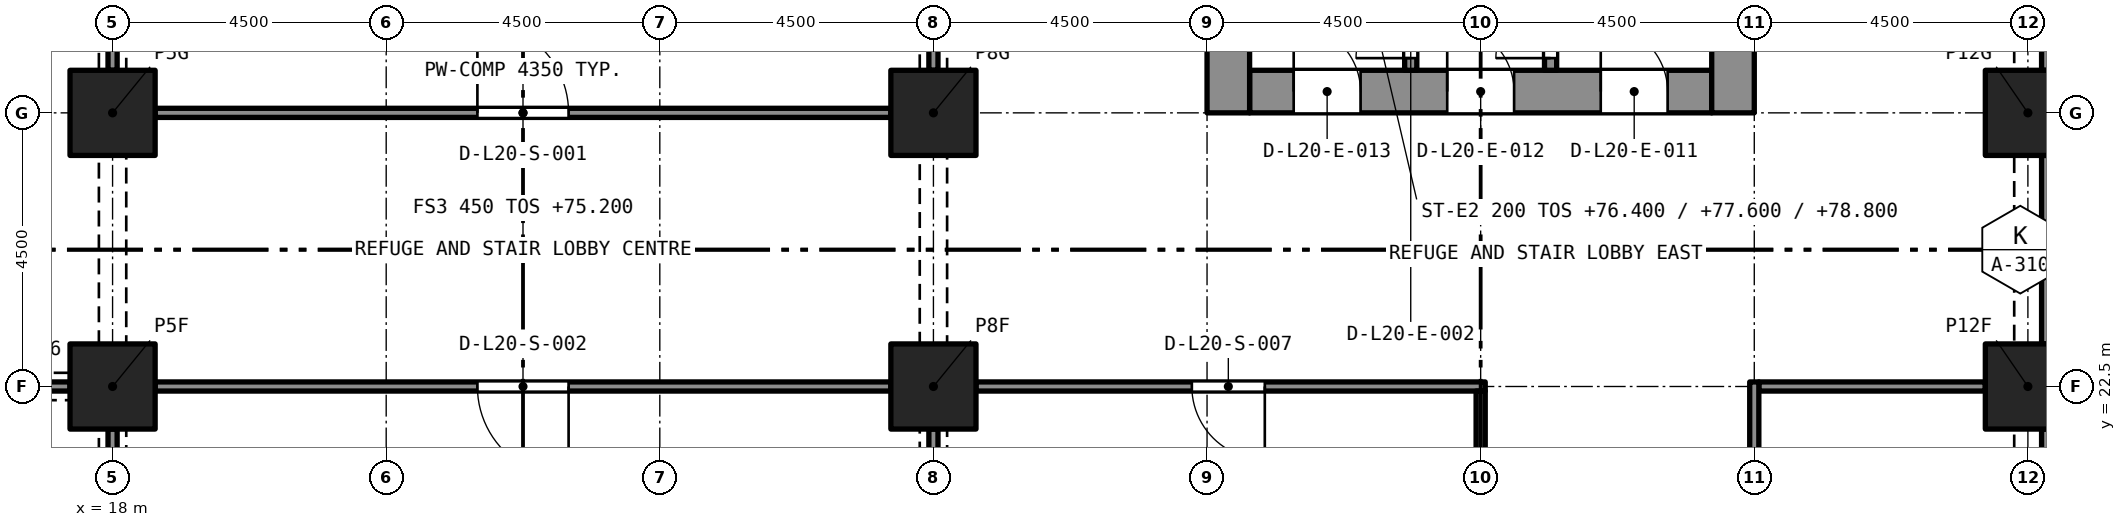
"""IFC4 building model, lengths in metres.
Left out: names, types, materials, properties, quantities, classifications, styles, units other than length and angle.
Written with IfcOpenShell. Run it as: python <this file> out.ifc"""

import sys

from ifc_helpers import new_model, si_unit, direction, frame, frame_2d, origin, origin_2d, place, context, subcontext, project, spatial, rectangle, extrude, element, fill, save


model = new_model("IFC4")
c1 = context("Model", 3, precision=1e-05, world=origin(), true_north=direction((0.0, 1.0)))
c2 = subcontext(c1, "Body", "Model", "MODEL_VIEW")
j1 = project(units=[si_unit("LENGTHUNIT", "METRE"), si_unit("PLANEANGLEUNIT", "RADIAN")], contexts=[c1])
p1 = place(None, origin())
s1 = spatial("IfcSite", under=j1, at=p1, CompositionType="ELEMENT")
p2 = place(p1, origin())
s2 = spatial("IfcBuilding", under=s1, at=p2, CompositionType="ELEMENT")
p3 = place(p2, frame((0.0, 0.0, 75.2)))
s3 = spatial("IfcBuildingStorey", under=s2, at=p3, CompositionType="ELEMENT", Elevation=75.2)
for number, where, z_axis, x_axis in (
    (1, (18.0, 22.5, 0.0), (0.0, 0.0, 1.0), (1.0, 0.0, 0.0)),
    (2, (31.5, 22.5, 0.0), (0.0, 0.0, 1.0), (1.0, 0.0, 0.0)),
    (3, (49.5, 22.5, 0.0), (0.0, 0.0, 1.0), (1.0, 0.0, 0.0)),
    (4, (18.0, 27.0, 0.0), (0.0, 0.0, 1.0), (1.0, 0.0, 0.0)),
    (5, (31.5, 27.0, 0.0), (0.0, 0.0, 1.0), (1.0, 0.0, 0.0)),
    (6, (49.5, 27.0, 0.0), (0.0, 0.0, 1.0), (1.0, 0.0, 0.0)),
):
    element("IfcColumn", number, at=place(p3, frame(where, z_axis=z_axis, x_axis=x_axis)), inside=s3, PredefinedType="COLUMN", context=c2, shape_type="SweptSolid", body=[
        extrude(rectangle(XDim=1.4, YDim=1.4, at=origin_2d()), origin(), (0.0, 0.0, 1.0), 4.8),
    ])
p4 = place(p3, frame((36.7, 27.35, 0.0), z_axis=(0.0, 0.0, 1.0), x_axis=(1.0, 0.0, 0.0)))
e7 = element("IfcWall", 7, at=p4, inside=s3, PredefinedType="SOLIDWALL", context=c2, shape_type="SweptSolid", body=[
    extrude(rectangle(XDim=7.6, YDim=0.7, at=frame_2d((3.8, 0.0))), origin(), (0.0, 0.0, 1.0), 4.8),
])
p5 = place(p4, frame((5.775, 0.0, 0.0)))
e8 = element("IfcOpeningElement", 8, at=p5, cuts=e7, PredefinedType="OPENING", context=c2, shape_type="SweptSolid", body=[
    extrude(rectangle(XDim=1.1, YDim=2.1, at=frame_2d((0.55, 1.05))), frame((0.0, 0.36, 0.0), z_axis=(0.0, -1.0, 0.0), x_axis=(1.0, 0.0, 0.0)), (0.0, 0.0, 1.0), 0.72),
])
p6 = place(p4, frame((3.25, 0.0, 0.0)))
e9 = element("IfcOpeningElement", 9, at=p6, cuts=e7, PredefinedType="OPENING", context=c2, shape_type="SweptSolid", body=[
    extrude(rectangle(XDim=1.1, YDim=2.1, at=frame_2d((0.55, 1.05))), frame((0.0, 0.36, 0.0), z_axis=(0.0, -1.0, 0.0), x_axis=(1.0, 0.0, 0.0)), (0.0, 0.0, 1.0), 0.72),
])
p7 = place(p4, frame((0.725, 0.0, 0.0)))
e10 = element("IfcOpeningElement", 10, at=p7, cuts=e7, PredefinedType="OPENING", context=c2, shape_type="SweptSolid", body=[
    extrude(rectangle(XDim=1.1, YDim=2.1, at=frame_2d((0.55, 1.05))), frame((0.0, 0.36, 0.0), z_axis=(0.0, -1.0, 0.0), x_axis=(1.0, 0.0, 0.0)), (0.0, 0.0, 1.0), 0.72),
])
p8 = place(p3, frame((36.35, 27.0, 0.0), z_axis=(0.0, 0.0, 1.0), x_axis=(0.0, 1.0, 0.0)))
e11 = element("IfcWall", 11, at=p8, inside=s3, PredefinedType="SOLIDWALL", context=c2, shape_type="SweptSolid", body=[
    extrude(rectangle(XDim=13.5, YDim=0.7, at=frame_2d((6.75, 0.0))), origin(), (0.0, 0.0, 1.0), 4.8),
])
p9 = place(p8, frame((8.95, 0.0, 0.0)))
e12 = element("IfcOpeningElement", 12, at=p9, cuts=e11, PredefinedType="OPENING", context=c2, shape_type="SweptSolid", body=[
    extrude(rectangle(XDim=1.2, YDim=2.1, at=frame_2d((0.6, 1.05))), frame((0.0, 0.36, 0.0), z_axis=(0.0, -1.0, 0.0), x_axis=(1.0, 0.0, 0.0)), (0.0, 0.0, 1.0), 0.72),
])
p10 = place(p3, frame((44.65, 27.0, 0.0), z_axis=(0.0, 0.0, 1.0), x_axis=(0.0, 1.0, 0.0)))
e13 = element("IfcWall", 13, at=p10, inside=s3, PredefinedType="SOLIDWALL", context=c2, shape_type="SweptSolid", body=[
    extrude(rectangle(XDim=13.5, YDim=0.7, at=frame_2d((6.75, 0.0))), origin(), (0.0, 0.0, 1.0), 4.8),
])
p11 = place(p10, frame((8.95, 0.0, 0.0)))
e14 = element("IfcOpeningElement", 14, at=p11, cuts=e13, PredefinedType="OPENING", context=c2, shape_type="SweptSolid", body=[
    extrude(rectangle(XDim=1.2, YDim=2.1, at=frame_2d((0.6, 1.05))), frame((0.0, 0.36, 0.0), z_axis=(0.0, -1.0, 0.0), x_axis=(1.0, 0.0, 0.0)), (0.0, 0.0, 1.0), 0.72),
])
for number, where, z_axis, x_axis in (
    (15, (49.875, 21.8, 0.0), (0.0, 0.0, 1.0), (0.0, -1.0, 0.0)),
    (16, (49.875, 26.3, 0.0), (0.0, 0.0, 1.0), (0.0, -1.0, 0.0)),
    (17, (49.875, 30.8, 0.0), (0.0, 0.0, 1.0), (0.0, -1.0, 0.0)),
):
    element("IfcWall", number, at=place(p3, frame(where, z_axis=z_axis, x_axis=x_axis)), inside=s3, PredefinedType="SOLIDWALL", context=c2, shape_type="SweptSolid", body=[
        extrude(rectangle(XDim=3.1, YDim=0.3, at=frame_2d((1.55, 0.0))), origin(), (0.0, 0.0, 1.0), 4.8),
    ])
p12 = place(p3, frame((41.65, 27.7, 0.0), z_axis=(0.0, 0.0, 1.0), x_axis=(0.0, 1.0, 0.0)))
e18 = element("IfcWall", 18, at=p12, inside=s3, PredefinedType="SOLIDWALL", context=c2, shape_type="SweptSolid", body=[
    extrude(rectangle(XDim=5.4, YDim=0.2, at=frame_2d((2.7, 0.0))), origin(), (0.0, 0.0, 1.0), 4.5),
])
p13 = place(p12, frame((0.2, 0.0, 0.0)))
e19 = element("IfcOpeningElement", 19, at=p13, cuts=e18, PredefinedType="OPENING", context=c2, shape_type="SweptSolid", body=[
    extrude(rectangle(XDim=0.9, YDim=2.1, at=frame_2d((0.45, 1.05))), frame((0.0, 0.11, 0.0), z_axis=(0.0, -1.0, 0.0), x_axis=(1.0, 0.0, 0.0)), (0.0, 0.0, 1.0), 0.22),
])
p14 = place(p3, frame((39.35, 27.7, 0.0), z_axis=(0.0, 0.0, 1.0), x_axis=(0.0, 1.0, 0.0)))
e20 = element("IfcWall", 20, at=p14, inside=s3, PredefinedType="SOLIDWALL", context=c2, shape_type="SweptSolid", body=[
    extrude(rectangle(XDim=5.4, YDim=0.2, at=frame_2d((2.7, 0.0))), origin(), (0.0, 0.0, 1.0), 4.5),
])
p15 = place(p14, frame((0.2, 0.0, 0.0)))
e21 = element("IfcOpeningElement", 21, at=p15, cuts=e20, PredefinedType="OPENING", context=c2, shape_type="SweptSolid", body=[
    extrude(rectangle(XDim=0.9, YDim=2.1, at=frame_2d((0.45, 1.05))), frame((0.0, 0.11, 0.0), z_axis=(0.0, -1.0, 0.0), x_axis=(1.0, 0.0, 0.0)), (0.0, 0.0, 1.0), 0.22),
])
p16 = place(p3, frame((18.7, 27.0, 0.0), z_axis=(0.0, 0.0, 1.0), x_axis=(1.0, 0.0, 0.0)))
e22 = element("IfcWall", 22, at=p16, inside=s3, PredefinedType="PARTITIONING", context=c2, shape_type="SweptSolid", body=[
    extrude(rectangle(XDim=12.1, YDim=0.15, at=frame_2d((6.05, 0.0))), origin(), (0.0, 0.0, 1.0), 4.35),
])
p17 = place(p16, frame((5.3, 0.0, 0.0)))
e23 = element("IfcOpeningElement", 23, at=p17, cuts=e22, PredefinedType="OPENING", context=c2, shape_type="SweptSolid", body=[
    extrude(rectangle(XDim=1.5, YDim=2.4, at=frame_2d((0.75, 1.2))), frame((0.0, 0.085, 0.0), z_axis=(0.0, -1.0, 0.0), x_axis=(1.0, 0.0, 0.0)), (0.0, 0.0, 1.0), 0.17),
])
p18 = place(p3, frame((30.8, 22.5, 0.0), z_axis=(0.0, 0.0, 1.0), x_axis=(-1.0, 0.0, 0.0)))
e24 = element("IfcWall", 24, at=p18, inside=s3, PredefinedType="PARTITIONING", context=c2, shape_type="SweptSolid", body=[
    extrude(rectangle(XDim=12.1, YDim=0.15, at=frame_2d((6.05, 0.0))), origin(), (0.0, 0.0, 1.0), 4.35),
])
p19 = place(p18, frame((5.3, 0.0, 0.0)))
e25 = element("IfcOpeningElement", 25, at=p19, cuts=e24, PredefinedType="OPENING", context=c2, shape_type="SweptSolid", body=[
    extrude(rectangle(XDim=1.5, YDim=2.4, at=frame_2d((0.75, 1.2))), frame((0.0, 0.085, 0.0), z_axis=(0.0, -1.0, 0.0), x_axis=(1.0, 0.0, 0.0)), (0.0, 0.0, 1.0), 0.17),
])
for number, where, z_axis, x_axis in (
    (26, (31.5, 27.7, 0.0), (0.0, 0.0, 1.0), (0.0, 1.0, 0.0)),
    (27, (18.0, 27.7, 0.0), (0.0, 0.0, 1.0), (0.0, 1.0, 0.0)),
    (28, (31.5, 18.7, 0.0), (0.0, 0.0, 1.0), (0.0, 1.0, 0.0)),
    (29, (18.0, 18.7, 0.0), (0.0, 0.0, 1.0), (0.0, 1.0, 0.0)),
):
    element("IfcWall", number, at=place(p3, frame(where, z_axis=z_axis, x_axis=x_axis)), inside=s3, PredefinedType="PARTITIONING", context=c2, shape_type="SweptSolid", body=[
        extrude(rectangle(XDim=3.1, YDim=0.15, at=frame_2d((1.55, 0.0))), origin(), (0.0, 0.0, 1.0), 3.98),
    ])
p20 = place(p3, frame((40.575, 22.5, 0.0), z_axis=(0.0, 0.0, 1.0), x_axis=(-1.0, 0.0, 0.0)))
e30 = element("IfcWall", 30, at=p20, inside=s3, PredefinedType="PARTITIONING", context=c2, shape_type="SweptSolid", body=[
    extrude(rectangle(XDim=8.375, YDim=0.15, at=frame_2d((4.188, 0.0))), origin(), (0.0, 0.0, 1.0), 4.5),
])
p21 = place(p20, frame((3.625, 0.0, 0.0)))
e31 = element("IfcOpeningElement", 31, at=p21, cuts=e30, PredefinedType="OPENING", context=c2, shape_type="SweptSolid", body=[
    extrude(rectangle(XDim=1.2, YDim=2.1, at=frame_2d((0.6, 1.05))), frame((0.0, 0.085, 0.0), z_axis=(0.0, -1.0, 0.0), x_axis=(1.0, 0.0, 0.0)), (0.0, 0.0, 1.0), 0.17),
])
p22 = place(p3, frame((45.075, 22.5, 0.0), z_axis=(0.0, 0.0, 1.0), x_axis=(1.0, 0.0, 0.0)))
e32 = element("IfcWall", 32, at=p22, inside=s3, PredefinedType="PARTITIONING", context=c2, shape_type="SweptSolid", body=[
    extrude(rectangle(XDim=3.725, YDim=0.15, at=frame_2d((1.863, 0.0))), origin(), (0.0, 0.0, 1.0), 4.5),
])
p23 = place(p3, frame((40.5, 13.5, 0.0), z_axis=(0.0, 0.0, 1.0), x_axis=(0.0, 1.0, 0.0)))
e33 = element("IfcWall", 33, at=p23, inside=s3, PredefinedType="PARTITIONING", context=c2, shape_type="SweptSolid", body=[
    extrude(rectangle(XDim=8.925, YDim=0.15, at=frame_2d((4.462, 0.0))), origin(), (0.0, 0.0, 1.0), 4.5),
])
p24 = place(p3, frame((45.0, 22.575, 0.0), z_axis=(0.0, 0.0, 1.0), x_axis=(0.0, -1.0, 0.0)))
e34 = element("IfcWall", 34, at=p24, inside=s3, PredefinedType="PARTITIONING", context=c2, shape_type="SweptSolid", body=[
    extrude(rectangle(XDim=9.075, YDim=0.15, at=frame_2d((4.538, 0.0))), origin(), (0.0, 0.0, 1.0), 4.5),
])
p25 = place(p24, frame((4.075, 0.0, 0.0)))
e35 = element("IfcOpeningElement", 35, at=p25, cuts=e34, PredefinedType="OPENING", context=c2, shape_type="SweptSolid", body=[
    extrude(rectangle(XDim=1.0, YDim=2.1, at=frame_2d((0.5, 1.05))), frame((0.0, 0.085, 0.0), z_axis=(0.0, -1.0, 0.0), x_axis=(1.0, 0.0, 0.0)), (0.0, 0.0, 1.0), 0.17),
])
p26 = place(p3, frame((17.3, 22.5, 0.0), z_axis=(0.0, 0.0, 1.0), x_axis=(-1.0, 0.0, 0.0)))
e36 = element("IfcWall", 36, at=p26, inside=s3, PredefinedType="PARTITIONING", context=c2, shape_type="SweptSolid", body=[
    extrude(rectangle(XDim=3.1, YDim=0.15, at=frame_2d((1.55, 0.0))), origin(), (0.0, 0.0, 1.0), 3.98),
])
p27 = place(p26, frame((0.95, 0.0, 0.0)))
e37 = element("IfcOpeningElement", 37, at=p27, cuts=e36, PredefinedType="OPENING", context=c2, shape_type="SweptSolid", body=[
    extrude(rectangle(XDim=1.2, YDim=2.1, at=frame_2d((0.6, 1.05))), frame((0.0, 0.085, 0.0), z_axis=(0.0, -1.0, 0.0), x_axis=(1.0, 0.0, 0.0)), (0.0, 0.0, 1.0), 0.17),
])
p28 = place(p13, origin())
e38 = element("IfcDoor", 38, at=p28, inside=s3, OperationType="SINGLE_SWING_LEFT", PredefinedType="DOOR", context=c2, shape_type="SweptSolid", body=[
    extrude(rectangle(XDim=0.9, YDim=2.1, at=frame_2d((0.45, 1.05))), frame((0.0, 0.025, 0.0), z_axis=(0.0, -1.0, 0.0), x_axis=(1.0, 0.0, 0.0)), (0.0, 0.0, 1.0), 0.05),
])
fill(e19, e38)
p29 = place(p15, origin())
e39 = element("IfcDoor", 39, at=p29, inside=s3, OperationType="SINGLE_SWING_LEFT", PredefinedType="DOOR", context=c2, shape_type="SweptSolid", body=[
    extrude(rectangle(XDim=0.9, YDim=2.1, at=frame_2d((0.45, 1.05))), frame((0.0, 0.025, 0.0), z_axis=(0.0, -1.0, 0.0), x_axis=(1.0, 0.0, 0.0)), (0.0, 0.0, 1.0), 0.05),
])
fill(e21, e39)
p30 = place(p5, origin())
e40 = element("IfcDoor", 40, at=p30, inside=s3, OperationType="SINGLE_SWING_LEFT", PredefinedType="DOOR", context=c2, shape_type="SweptSolid", body=[
    extrude(rectangle(XDim=1.1, YDim=2.1, at=frame_2d((0.55, 1.05))), frame((0.0, 0.025, 0.0), z_axis=(0.0, -1.0, 0.0), x_axis=(1.0, 0.0, 0.0)), (0.0, 0.0, 1.0), 0.05),
])
fill(e8, e40)
p31 = place(p6, origin())
e41 = element("IfcDoor", 41, at=p31, inside=s3, OperationType="SINGLE_SWING_LEFT", PredefinedType="DOOR", context=c2, shape_type="SweptSolid", body=[
    extrude(rectangle(XDim=1.1, YDim=2.1, at=frame_2d((0.55, 1.05))), frame((0.0, 0.025, 0.0), z_axis=(0.0, -1.0, 0.0), x_axis=(1.0, 0.0, 0.0)), (0.0, 0.0, 1.0), 0.05),
])
fill(e9, e41)
p32 = place(p7, origin())
e42 = element("IfcDoor", 42, at=p32, inside=s3, OperationType="SINGLE_SWING_LEFT", PredefinedType="DOOR", context=c2, shape_type="SweptSolid", body=[
    extrude(rectangle(XDim=1.1, YDim=2.1, at=frame_2d((0.55, 1.05))), frame((0.0, 0.025, 0.0), z_axis=(0.0, -1.0, 0.0), x_axis=(1.0, 0.0, 0.0)), (0.0, 0.0, 1.0), 0.05),
])
fill(e10, e42)
p33 = place(p17, origin())
e43 = element("IfcDoor", 43, at=p33, inside=s3, OperationType="DOUBLE_DOOR_SINGLE_SWING", PredefinedType="DOOR", context=c2, shape_type="SweptSolid", body=[
    extrude(rectangle(XDim=1.5, YDim=2.4, at=frame_2d((0.75, 1.2))), frame((0.0, 0.025, 0.0), z_axis=(0.0, -1.0, 0.0), x_axis=(1.0, 0.0, 0.0)), (0.0, 0.0, 1.0), 0.05),
])
fill(e23, e43)
p34 = place(p19, origin())
e44 = element("IfcDoor", 44, at=p34, inside=s3, OperationType="DOUBLE_DOOR_SINGLE_SWING", PredefinedType="DOOR", context=c2, shape_type="SweptSolid", body=[
    extrude(rectangle(XDim=1.5, YDim=2.4, at=frame_2d((0.75, 1.2))), frame((0.0, 0.025, 0.0), z_axis=(0.0, -1.0, 0.0), x_axis=(1.0, 0.0, 0.0)), (0.0, 0.0, 1.0), 0.05),
])
fill(e25, e44)
p35 = place(p21, origin())
e45 = element("IfcDoor", 45, at=p35, inside=s3, OperationType="SINGLE_SWING_RIGHT", PredefinedType="DOOR", context=c2, shape_type="SweptSolid", body=[
    extrude(rectangle(XDim=1.2, YDim=2.1, at=frame_2d((0.6, 1.05))), frame((0.0, 0.025, 0.0), z_axis=(0.0, -1.0, 0.0), x_axis=(1.0, 0.0, 0.0)), (0.0, 0.0, 1.0), 0.05),
])
fill(e31, e45)
save(model, sys.argv[1])
